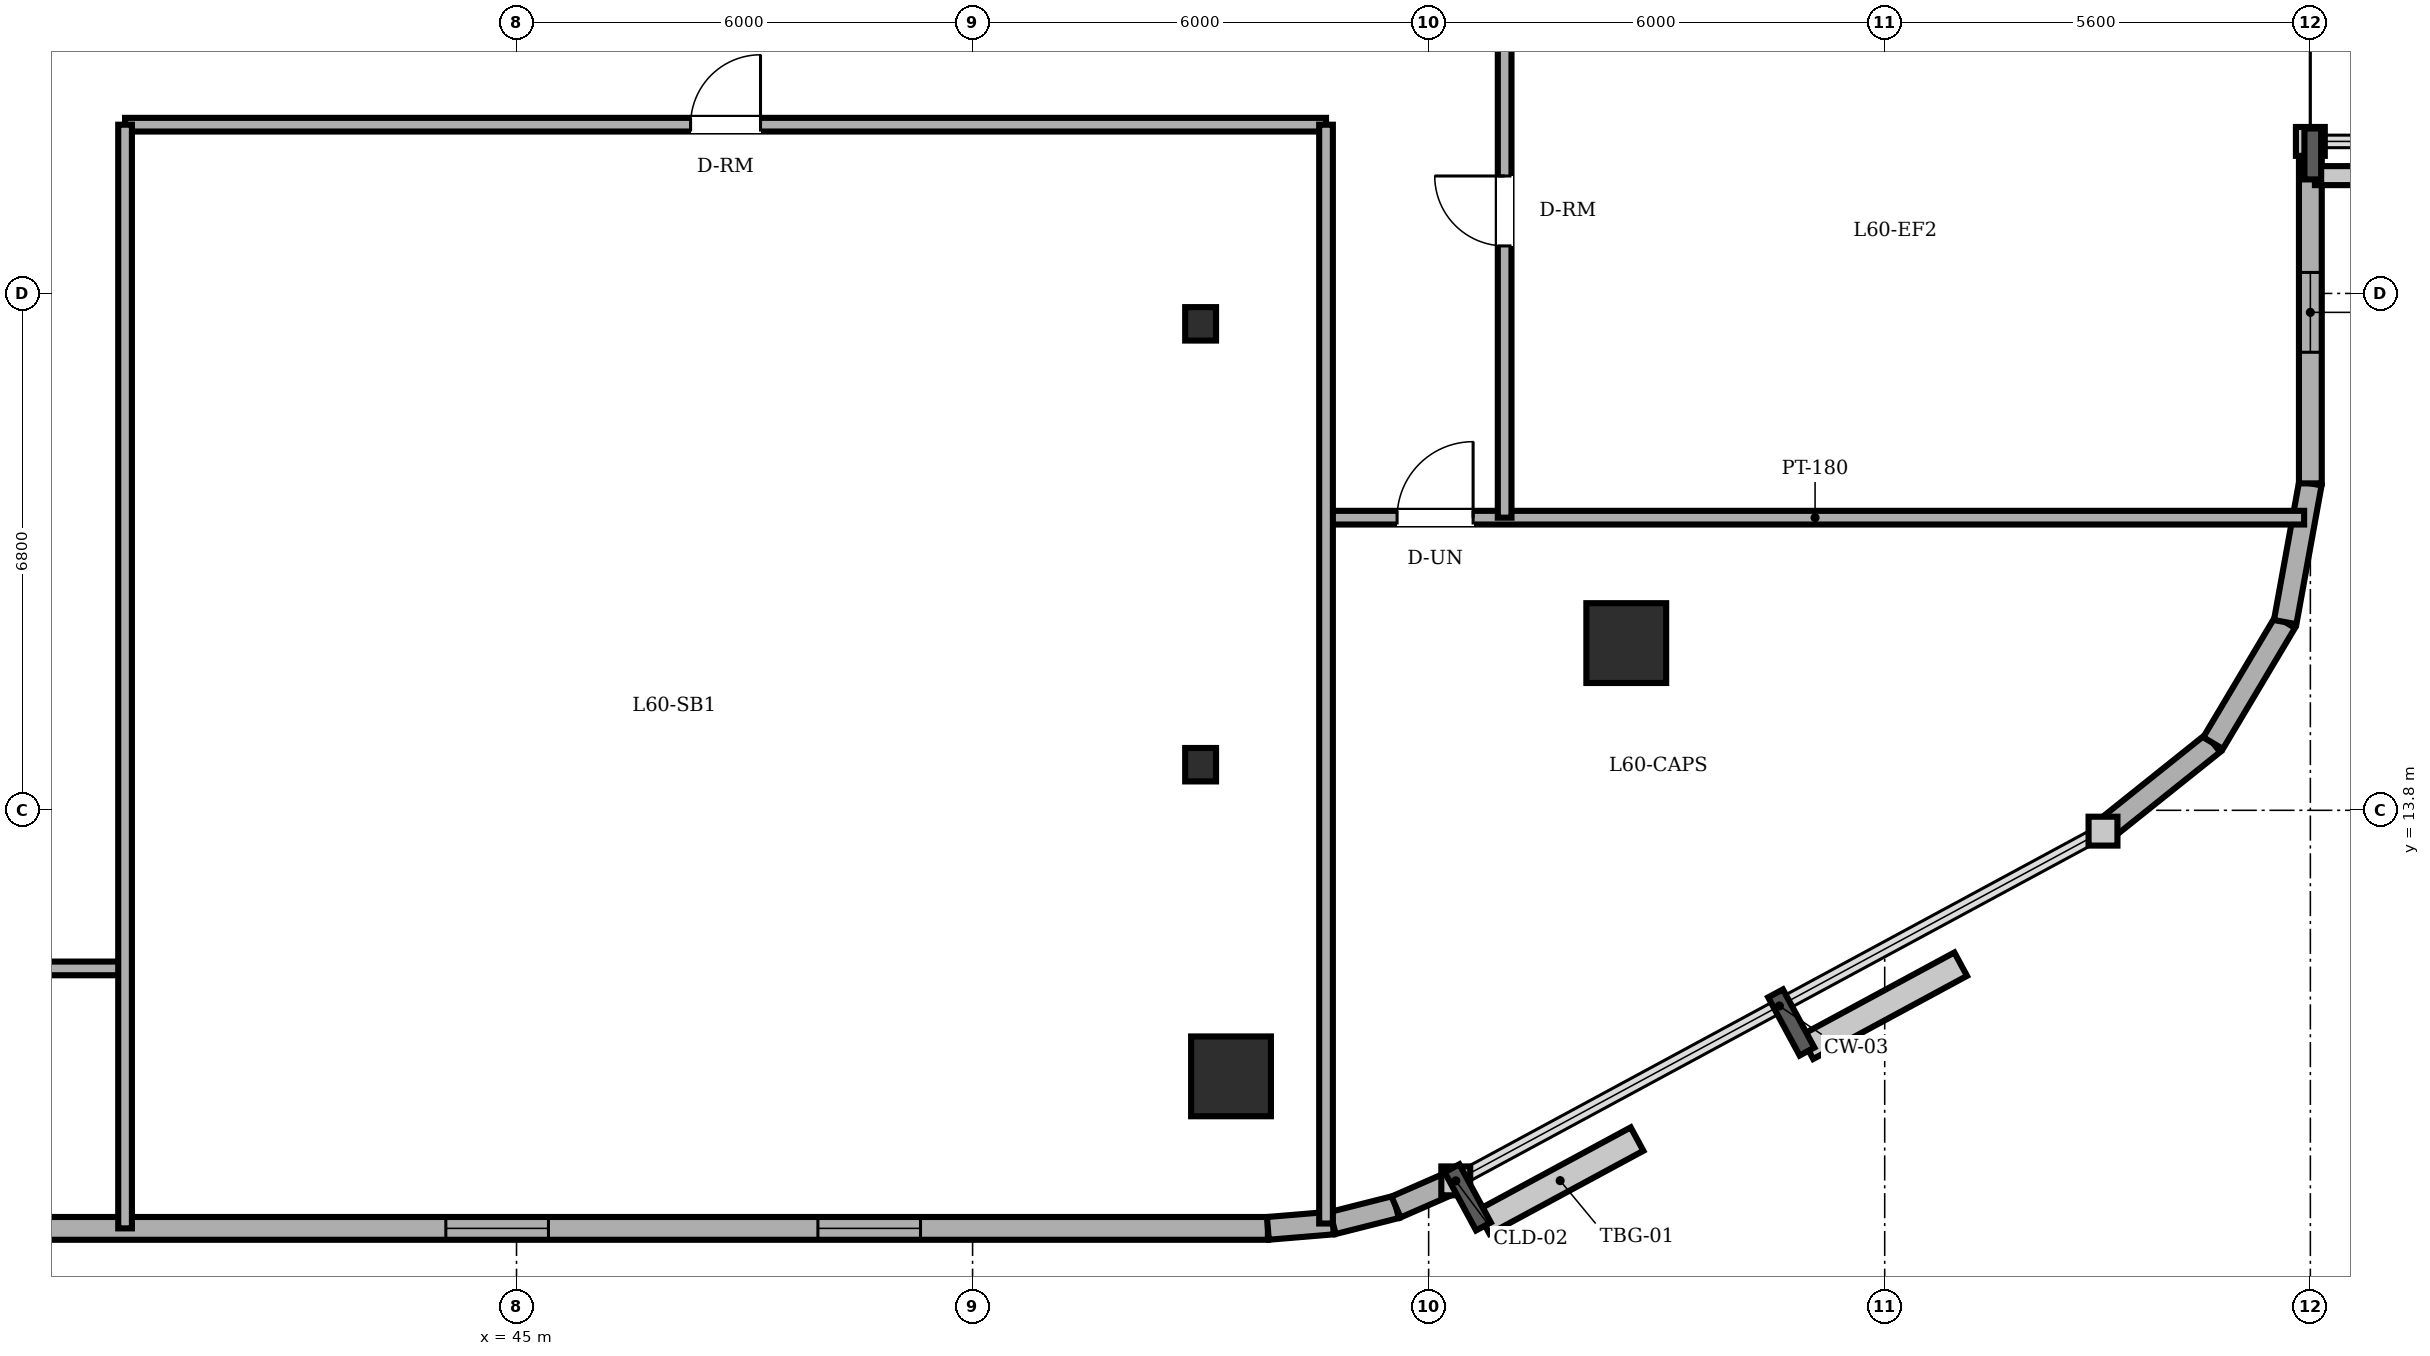
"""IFC4 building model, lengths in metres.
Left out: names, types, materials, properties, quantities, classifications, styles, units other than length and angle.
Written with IfcOpenShell. Run it as: python <this file> out.ifc"""

import sys

from ifc_helpers import new_model, si_unit, direction, frame, frame_2d, origin, origin_2d, place, context, subcontext, project, spatial, rectangle, circle, i_section, extrude, element, fill, save


model = new_model("IFC4")
c1 = context("Model", 3, precision=1e-05, world=origin(), true_north=direction((0.0, 1.0)))
c2 = subcontext(c1, "Body", "Model", "MODEL_VIEW")
j1 = project(units=[si_unit("LENGTHUNIT", "METRE"), si_unit("PLANEANGLEUNIT", "RADIAN")], contexts=[c1])
p1 = place(None, origin())
s1 = spatial("IfcSite", under=j1, at=p1, CompositionType="ELEMENT")
p2 = place(p1, origin())
s2 = spatial("IfcBuilding", under=s1, at=p2, CompositionType="ELEMENT")
p3 = place(p2, frame((0.0, 0.0, 230.1)))
s3 = spatial("IfcBuildingStorey", under=s2, at=p3, CompositionType="ELEMENT", Elevation=230.1)
for number, where, z_axis, x_axis in (
    (1, (54.4, 10.3, 0.0), (0.0, 0.0, 1.0), (1.0, 0.0, 0.0)),
    (2, (59.6, 16.0, 0.0), (0.0, 0.0, 1.0), (1.0, 0.0, 0.0)),
):
    element("IfcColumn", number, at=place(p3, frame(where, z_axis=z_axis, x_axis=x_axis)), inside=s3, PredefinedType="COLUMN", context=c2, shape_type="SweptSolid", body=[
        extrude(circle(Radius=0.525, at=origin_2d()), origin(), (0.0, 0.0, 1.0), 3.6),
    ])
for number, where, z_axis, x_axis in (
    (3, (54.0, 14.4, 0.0), (0.0, 0.0, 1.0), (1.0, 0.0, 0.0)),
    (4, (54.0, 20.2, 0.0), (0.0, 0.0, 1.0), (1.0, 0.0, 0.0)),
):
    element("IfcColumn", number, at=place(p3, frame(where, z_axis=z_axis, x_axis=x_axis)), inside=s3, PredefinedType="COLUMN", context=c2, shape_type="SweptSolid", body=[
        extrude(i_section(OverallWidth=0.406, OverallDepth=0.44, WebThickness=0.024, FlangeThickness=0.039, FilletRadius=0.015, at=origin_2d()), origin(), (0.0, 0.0, 1.0), 3.6),
    ])
p4 = place(p3, frame((22.4, 8.3, 0.0), z_axis=(0.0, 0.0, 1.0), x_axis=(1.0, 0.0, 0.0)))
e5 = element("IfcWall", 5, at=p4, inside=s3, PredefinedType="SOLIDWALL", context=c2, shape_type="SweptSolid", body=[
    extrude(rectangle(XDim=32.485, YDim=0.3, at=frame_2d((16.243, 0.0))), origin(), (0.0, 0.0, 1.0), 3.4),
])
p5 = place(p4, frame((8.538, 0.0, 0.0)))
e6 = element("IfcOpeningElement", 6, at=p5, cuts=e5, PredefinedType="OPENING", context=c2, shape_type="SweptSolid", body=[
    extrude(rectangle(XDim=0.95, YDim=2.2, at=frame_2d((0.475, 1.1))), frame((0.0, 0.16, 0.0), z_axis=(0.0, -1.0, 0.0), x_axis=(1.0, 0.0, 0.0)), (0.0, 0.0, 1.0), 0.32),
])
p6 = place(p4, frame((1.3, 0.0, 0.85)))
e7 = element("IfcOpeningElement", 7, at=p6, cuts=e5, PredefinedType="OPENING", context=c2, shape_type="SweptSolid", body=[
    extrude(rectangle(XDim=1.35, YDim=1.55, at=frame_2d((0.675, 0.775))), frame((0.0, 0.16, 0.0), z_axis=(0.0, -1.0, 0.0), x_axis=(1.0, 0.0, 0.0)), (0.0, 0.0, 1.0), 0.32),
])
p7 = place(p4, frame((4.825, 0.0, 0.85)))
e8 = element("IfcOpeningElement", 8, at=p7, cuts=e5, PredefinedType="OPENING", context=c2, shape_type="SweptSolid", body=[
    extrude(rectangle(XDim=1.35, YDim=1.55, at=frame_2d((0.675, 0.775))), frame((0.0, 0.16, 0.0), z_axis=(0.0, -1.0, 0.0), x_axis=(1.0, 0.0, 0.0)), (0.0, 0.0, 1.0), 0.32),
])
p8 = place(p4, frame((10.075, 0.0, 0.85)))
e9 = element("IfcOpeningElement", 9, at=p8, cuts=e5, PredefinedType="OPENING", context=c2, shape_type="SweptSolid", body=[
    extrude(rectangle(XDim=1.35, YDim=1.55, at=frame_2d((0.675, 0.775))), frame((0.0, 0.16, 0.0), z_axis=(0.0, -1.0, 0.0), x_axis=(1.0, 0.0, 0.0)), (0.0, 0.0, 1.0), 0.32),
])
p9 = place(p4, frame((13.425, 0.0, 0.85)))
e10 = element("IfcOpeningElement", 10, at=p9, cuts=e5, PredefinedType="OPENING", context=c2, shape_type="SweptSolid", body=[
    extrude(rectangle(XDim=1.35, YDim=1.55, at=frame_2d((0.675, 0.775))), frame((0.0, 0.16, 0.0), z_axis=(0.0, -1.0, 0.0), x_axis=(1.0, 0.0, 0.0)), (0.0, 0.0, 1.0), 0.32),
])
p10 = place(p4, frame((21.67, 0.0, 0.85)))
e11 = element("IfcOpeningElement", 11, at=p10, cuts=e5, PredefinedType="OPENING", context=c2, shape_type="SweptSolid", body=[
    extrude(rectangle(XDim=1.35, YDim=1.55, at=frame_2d((0.675, 0.775))), frame((0.0, 0.16, 0.0), z_axis=(0.0, -1.0, 0.0), x_axis=(1.0, 0.0, 0.0)), (0.0, 0.0, 1.0), 0.32),
])
p11 = place(p4, frame((26.565, 0.0, 0.85)))
e12 = element("IfcOpeningElement", 12, at=p11, cuts=e5, PredefinedType="OPENING", context=c2, shape_type="SweptSolid", body=[
    extrude(rectangle(XDim=1.35, YDim=1.55, at=frame_2d((0.675, 0.775))), frame((0.0, 0.16, 0.0), z_axis=(0.0, -1.0, 0.0), x_axis=(1.0, 0.0, 0.0)), (0.0, 0.0, 1.0), 0.32),
])
p12 = place(p3, frame((54.885, 8.3, 0.0), z_axis=(0.0, 0.0, 1.0), x_axis=(0.996565355958, 0.082809971041, 0.0)))
e13 = element("IfcWall", 13, at=p12, inside=s3, PredefinedType="SOLIDWALL", context=c2, shape_type="SweptSolid", body=[
    extrude(rectangle(XDim=0.858, YDim=0.3, at=frame_2d((0.429, 0.0))), origin(), (0.0, 0.0, 1.0), 3.4),
])
p13 = place(p3, frame((55.74, 8.371, 0.0), z_axis=(0.0, 0.0, 1.0), x_axis=(0.969536346338, 0.244947490555, 0.0)))
e14 = element("IfcWall", 14, at=p13, inside=s3, PredefinedType="SOLIDWALL", context=c2, shape_type="SweptSolid", body=[
    extrude(rectangle(XDim=0.857, YDim=0.3, at=frame_2d((0.429, 0.0))), origin(), (0.0, 0.0, 1.0), 3.4),
])
p14 = place(p3, frame((56.571, 8.581, 0.0), z_axis=(0.0, 0.0, 1.0), x_axis=(0.916085473636, 0.400983048261, 0.0)))
e15 = element("IfcWall", 15, at=p14, inside=s3, PredefinedType="SOLIDWALL", context=c2, shape_type="SweptSolid", body=[
    extrude(rectangle(XDim=0.858, YDim=0.3, at=frame_2d((0.429, 0.0))), origin(), (0.0, 0.0, 1.0), 3.4),
])
p15 = place(p3, frame((65.872, 13.526, 0.0), z_axis=(0.0, 0.0, 1.0), x_axis=(0.780920189257, 0.624630817372, 0.0)))
e16 = element("IfcWall", 16, at=p15, inside=s3, PredefinedType="SOLIDWALL", context=c2, shape_type="SweptSolid", body=[
    extrude(rectangle(XDim=1.854, YDim=0.3, at=frame_2d((0.927, 0.0))), origin(), (0.0, 0.0, 1.0), 3.4),
])
p16 = place(p3, frame((67.32, 14.684, 0.0), z_axis=(0.0, 0.0, 1.0), x_axis=(0.512072018927, 0.858942516955, 0.0)))
e17 = element("IfcWall", 17, at=p16, inside=s3, PredefinedType="SOLIDWALL", context=c2, shape_type="SweptSolid", body=[
    extrude(rectangle(XDim=1.853, YDim=0.3, at=frame_2d((0.927, 0.0))), origin(), (0.0, 0.0, 1.0), 3.4),
])
p17 = place(p3, frame((68.269, 16.276, 0.0), z_axis=(0.0, 0.0, 1.0), x_axis=(0.178468469252, 0.983945631365, 0.0)))
e18 = element("IfcWall", 18, at=p17, inside=s3, PredefinedType="SOLIDWALL", context=c2, shape_type="SweptSolid", body=[
    extrude(rectangle(XDim=1.855, YDim=0.3, at=frame_2d((0.927, 0.0))), origin(), (0.0, 0.0, 1.0), 3.4),
])
p18 = place(p3, frame((68.6, 18.101, 0.0), z_axis=(0.0, 0.0, 1.0), x_axis=(0.0, 1.0, 0.0)))
e19 = element("IfcWall", 19, at=p18, inside=s3, PredefinedType="SOLIDWALL", context=c2, shape_type="SweptSolid", body=[
    extrude(rectangle(XDim=4.499, YDim=0.3, at=frame_2d((2.25, 0.0))), origin(), (0.0, 0.0, 1.0), 3.4),
])
p19 = place(p18, frame((1.725, 0.0, 0.85)))
e20 = element("IfcOpeningElement", 20, at=p19, cuts=e19, PredefinedType="OPENING", context=c2, shape_type="SweptSolid", body=[
    extrude(rectangle(XDim=1.05, YDim=1.55, at=frame_2d((0.525, 0.775))), frame((0.0, 0.16, 0.0), z_axis=(0.0, -1.0, 0.0), x_axis=(1.0, 0.0, 0.0)), (0.0, 0.0, 1.0), 0.32),
])
p20 = place(p3, frame((17.677, 11.72, 0.0), z_axis=(0.0, 0.0, 1.0), x_axis=(1.0, 0.0, 0.0)))
e21 = element("IfcWall", 21, at=p20, inside=s3, PredefinedType="PARTITIONING", context=c2, shape_type="SweptSolid", body=[
    extrude(rectangle(XDim=22.173, YDim=0.18, at=frame_2d((11.086, 0.0))), origin(), (0.0, 0.0, 1.0), 3.4),
])
p21 = place(p20, frame((9.763, 0.0, 0.0)))
e22 = element("IfcOpeningElement", 22, at=p21, cuts=e21, PredefinedType="OPENING", context=c2, shape_type="SweptSolid", body=[
    extrude(rectangle(XDim=0.92, YDim=2.1, at=frame_2d((0.46, 1.05))), frame((0.0, 0.1, 0.0), z_axis=(0.0, -1.0, 0.0), x_axis=(1.0, 0.0, 0.0)), (0.0, 0.0, 1.0), 0.2),
])
p22 = place(p20, frame((4.063, 0.0, 0.0)))
e23 = element("IfcOpeningElement", 23, at=p22, cuts=e21, PredefinedType="OPENING", context=c2, shape_type="SweptSolid", body=[
    extrude(rectangle(XDim=0.92, YDim=2.1, at=frame_2d((0.46, 1.05))), frame((0.0, 0.1, 0.0), z_axis=(0.0, -1.0, 0.0), x_axis=(1.0, 0.0, 0.0)), (0.0, 0.0, 1.0), 0.2),
])
p23 = place(p20, frame((16.428, 0.0, 0.0)))
e24 = element("IfcOpeningElement", 24, at=p23, cuts=e21, PredefinedType="OPENING", context=c2, shape_type="SweptSolid", body=[
    extrude(rectangle(XDim=0.92, YDim=2.1, at=frame_2d((0.46, 1.05))), frame((0.0, 0.1, 0.0), z_axis=(0.0, -1.0, 0.0), x_axis=(1.0, 0.0, 0.0)), (0.0, 0.0, 1.0), 0.2),
])
p24 = place(p3, frame((55.65, 17.65, 0.0), z_axis=(0.0, 0.0, 1.0), x_axis=(1.0, 0.0, 0.0)))
e25 = element("IfcWall", 25, at=p24, inside=s3, PredefinedType="PARTITIONING", context=c2, shape_type="SweptSolid", body=[
    extrude(rectangle(XDim=12.868, YDim=0.18, at=frame_2d((6.434, 0.0))), origin(), (0.0, 0.0, 1.0), 3.4),
])
p25 = place(p24, frame((0.935, 0.0, 0.0)))
e26 = element("IfcOpeningElement", 26, at=p25, cuts=e25, PredefinedType="OPENING", context=c2, shape_type="SweptSolid", body=[
    extrude(rectangle(XDim=1.0, YDim=2.15, at=frame_2d((0.5, 1.075))), frame((0.0, 0.1, 0.0), z_axis=(0.0, -1.0, 0.0), x_axis=(1.0, 0.0, 0.0)), (0.0, 0.0, 1.0), 0.2),
])
p26 = place(p3, frame((39.85, 22.82, 0.0), z_axis=(0.0, 0.0, 1.0), x_axis=(1.0, 0.0, 0.0)))
e27 = element("IfcWall", 27, at=p26, inside=s3, PredefinedType="PARTITIONING", context=c2, shape_type="SweptSolid", body=[
    extrude(rectangle(XDim=15.8, YDim=0.18, at=frame_2d((7.9, 0.0))), origin(), (0.0, 0.0, 1.0), 3.4),
])
p27 = place(p26, frame((7.44, 0.0, 0.0)))
e28 = element("IfcOpeningElement", 28, at=p27, cuts=e27, PredefinedType="OPENING", context=c2, shape_type="SweptSolid", body=[
    extrude(rectangle(XDim=0.92, YDim=2.1, at=frame_2d((0.46, 1.05))), frame((0.0, 0.1, 0.0), z_axis=(0.0, -1.0, 0.0), x_axis=(1.0, 0.0, 0.0)), (0.0, 0.0, 1.0), 0.2),
])
p28 = place(p3, frame((39.85, 8.3, 0.0), z_axis=(0.0, 0.0, 1.0), x_axis=(0.0, 1.0, 0.0)))
e29 = element("IfcWall", 29, at=p28, inside=s3, PredefinedType="PARTITIONING", context=c2, shape_type="SweptSolid", body=[
    extrude(rectangle(XDim=14.52, YDim=0.18, at=frame_2d((7.26, 0.0))), origin(), (0.0, 0.0, 1.0), 3.4),
])
p29 = place(p3, frame((55.65, 8.364, 0.0), z_axis=(0.0, 0.0, 1.0), x_axis=(0.0, 1.0, 0.0)))
e30 = element("IfcWall", 30, at=p29, inside=s3, PredefinedType="PARTITIONING", context=c2, shape_type="SweptSolid", body=[
    extrude(rectangle(XDim=14.456, YDim=0.18, at=frame_2d((7.228, 0.0))), origin(), (0.0, 0.0, 1.0), 3.4),
])
p30 = place(p3, frame((58.0, 17.65, 0.0), z_axis=(0.0, 0.0, 1.0), x_axis=(0.0, 1.0, 0.0)))
e31 = element("IfcWall", 31, at=p30, inside=s3, PredefinedType="PARTITIONING", context=c2, shape_type="SweptSolid", body=[
    extrude(rectangle(XDim=12.7, YDim=0.18, at=frame_2d((6.35, 0.0))), origin(), (0.0, 0.0, 1.0), 3.4),
])
p31 = place(p30, frame((9.365, 0.0, 0.0)))
e32 = element("IfcOpeningElement", 32, at=p31, cuts=e31, PredefinedType="OPENING", context=c2, shape_type="SweptSolid", body=[
    extrude(rectangle(XDim=1.0, YDim=2.15, at=frame_2d((0.5, 1.075))), frame((0.0, 0.1, 0.0), z_axis=(0.0, -1.0, 0.0), x_axis=(1.0, 0.0, 0.0)), (0.0, 0.0, 1.0), 0.2),
])
p32 = place(p30, frame((3.575, 0.0, 0.0)))
e33 = element("IfcOpeningElement", 33, at=p32, cuts=e31, PredefinedType="OPENING", context=c2, shape_type="SweptSolid", body=[
    extrude(rectangle(XDim=0.92, YDim=2.1, at=frame_2d((0.46, 1.05))), frame((0.0, 0.1, 0.0), z_axis=(0.0, -1.0, 0.0), x_axis=(1.0, 0.0, 0.0)), (0.0, 0.0, 1.0), 0.2),
])
p33 = place(p10, origin())
e34 = element("IfcWindow", 34, at=p33, inside=s3, PartitioningType="SINGLE_PANEL", PredefinedType="WINDOW", context=c2, shape_type="SweptSolid", body=[
    extrude(rectangle(XDim=1.35, YDim=1.55, at=frame_2d((0.675, 0.775))), frame((0.0, 0.03, 0.0), z_axis=(0.0, -1.0, 0.0), x_axis=(1.0, 0.0, 0.0)), (0.0, 0.0, 1.0), 0.06),
])
fill(e11, e34)
p34 = place(p11, origin())
e35 = element("IfcWindow", 35, at=p34, inside=s3, PartitioningType="SINGLE_PANEL", PredefinedType="WINDOW", context=c2, shape_type="SweptSolid", body=[
    extrude(rectangle(XDim=1.35, YDim=1.55, at=frame_2d((0.675, 0.775))), frame((0.0, 0.03, 0.0), z_axis=(0.0, -1.0, 0.0), x_axis=(1.0, 0.0, 0.0)), (0.0, 0.0, 1.0), 0.06),
])
fill(e12, e35)
p35 = place(p19, origin())
e36 = element("IfcWindow", 36, at=p35, inside=s3, PartitioningType="SINGLE_PANEL", PredefinedType="WINDOW", context=c2, shape_type="SweptSolid", body=[
    extrude(rectangle(XDim=1.05, YDim=1.55, at=frame_2d((0.525, 0.775))), frame((0.0, 0.03, 0.0), z_axis=(0.0, -1.0, 0.0), x_axis=(1.0, 0.0, 0.0)), (0.0, 0.0, 1.0), 0.06),
])
fill(e20, e36)
p36 = place(p27, origin())
e37 = element("IfcDoor", 37, at=p36, inside=s3, OperationType="SINGLE_SWING_RIGHT", PredefinedType="DOOR", context=c2, shape_type="SweptSolid", body=[
    extrude(rectangle(XDim=0.92, YDim=2.1, at=frame_2d((0.46, 1.05))), frame((0.0, 0.025, 0.0), z_axis=(0.0, -1.0, 0.0), x_axis=(1.0, 0.0, 0.0)), (0.0, 0.0, 1.0), 0.05),
])
fill(e28, e37)
p37 = place(p25, origin())
e38 = element("IfcDoor", 38, at=p37, inside=s3, OperationType="SINGLE_SWING_RIGHT", PredefinedType="DOOR", context=c2, shape_type="SweptSolid", body=[
    extrude(rectangle(XDim=1.0, YDim=2.15, at=frame_2d((0.5, 1.075))), frame((0.0, 0.025, 0.0), z_axis=(0.0, -1.0, 0.0), x_axis=(1.0, 0.0, 0.0)), (0.0, 0.0, 1.0), 0.05),
])
fill(e26, e38)
p38 = place(p32, origin())
e39 = element("IfcDoor", 39, at=p38, inside=s3, OperationType="SINGLE_SWING_RIGHT", PredefinedType="DOOR", context=c2, shape_type="SweptSolid", body=[
    extrude(rectangle(XDim=0.92, YDim=2.1, at=frame_2d((0.46, 1.05))), frame((0.0, 0.025, 0.0), z_axis=(0.0, -1.0, 0.0), x_axis=(1.0, 0.0, 0.0)), (0.0, 0.0, 1.0), 0.05),
])
fill(e33, e39)
save(model, sys.argv[1])
